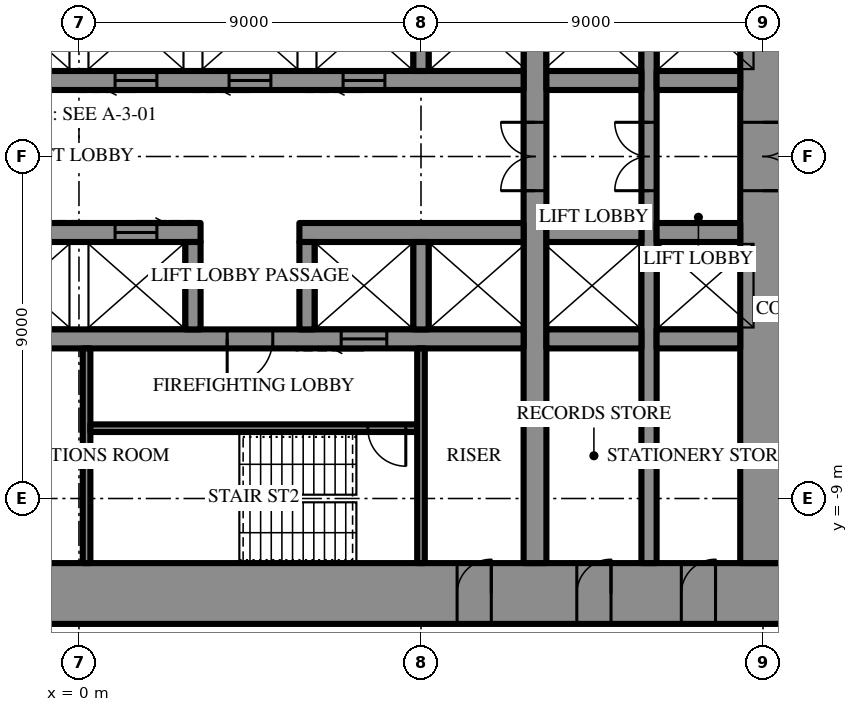
"""IFC4 building model, lengths in metres.
Left out: names, types, materials, properties, quantities, classifications, styles, units other than length and angle.
Written with IfcOpenShell. Run it as: python <this file> out.ifc"""

import sys

from ifc_helpers import new_model, si_unit, direction, frame, frame_2d, origin, place, context, subcontext, project, spatial, rectangle, extrude, element, fill, save


model = new_model("IFC4")
c1 = context("Model", 3, precision=1e-05, world=origin(), true_north=direction((0.0, 1.0)))
c2 = subcontext(c1, "Body", "Model", "MODEL_VIEW")
j1 = project(units=[si_unit("LENGTHUNIT", "METRE"), si_unit("PLANEANGLEUNIT", "RADIAN")], contexts=[c1])
p1 = place(None, origin())
s1 = spatial("IfcSite", under=j1, at=p1, CompositionType="ELEMENT")
p2 = place(p1, origin())
s2 = spatial("IfcBuilding", under=s1, at=p2, CompositionType="ELEMENT")
p3 = place(p2, frame((0.0, 0.0, 23.5)))
s3 = spatial("IfcBuildingStorey", under=s2, at=p3, CompositionType="ELEMENT", Elevation=23.5)
p4 = place(p3, frame((18.6, -11.5, 0.0), z_axis=(0.0, 0.0, 1.0), x_axis=(-1.0, 0.0, 0.0)))
e1 = element("IfcWall", 1, at=p4, inside=s3, PredefinedType="SHEAR", context=c2, shape_type="SweptSolid", body=[
    extrude(rectangle(XDim=37.2, YDim=1.6, at=frame_2d((18.6, 0.0))), origin(), (0.0, 0.0, 1.0), 4.2),
])
p5 = place(p4, frame((19.45, 0.0, 0.0)))
e2 = element("IfcOpeningElement", 2, at=p5, cuts=e1, PredefinedType="OPENING", context=c2, shape_type="SweptSolid", body=[
    extrude(rectangle(XDim=0.9, YDim=2.2, at=frame_2d((0.45, 1.1))), frame((0.0, 0.81, 0.0), z_axis=(0.0, -1.0, 0.0), x_axis=(1.0, 0.0, 0.0)), (0.0, 0.0, 1.0), 1.62),
])
p6 = place(p4, frame((22.45, 0.0, 0.0)))
e3 = element("IfcOpeningElement", 3, at=p6, cuts=e1, PredefinedType="OPENING", context=c2, shape_type="SweptSolid", body=[
    extrude(rectangle(XDim=0.9, YDim=2.2, at=frame_2d((0.45, 1.1))), frame((0.0, 0.81, 0.0), z_axis=(0.0, -1.0, 0.0), x_axis=(1.0, 0.0, 0.0)), (0.0, 0.0, 1.0), 1.62),
])
p7 = place(p4, frame((25.5, 0.0, 0.0)))
e4 = element("IfcOpeningElement", 4, at=p7, cuts=e1, PredefinedType="OPENING", context=c2, shape_type="SweptSolid", body=[
    extrude(rectangle(XDim=1.0, YDim=2.2, at=frame_2d((0.5, 1.1))), frame((0.0, 0.81, 0.0), z_axis=(0.0, -1.0, 0.0), x_axis=(1.0, 0.0, 0.0)), (0.0, 0.0, 1.0), 1.62),
])
p8 = place(p4, frame((1.85, 0.0, 0.0)))
e5 = element("IfcOpeningElement", 5, at=p8, cuts=e1, PredefinedType="OPENING", context=c2, shape_type="SweptSolid", body=[
    extrude(rectangle(XDim=0.9, YDim=2.2, at=frame_2d((0.45, 1.1))), frame((0.0, 0.81, 0.0), z_axis=(0.0, -1.0, 0.0), x_axis=(1.0, 0.0, 0.0)), (0.0, 0.0, 1.0), 1.62),
])
p9 = place(p4, frame((4.6, 0.0, 0.0)))
e6 = element("IfcOpeningElement", 6, at=p9, cuts=e1, PredefinedType="OPENING", context=c2, shape_type="SweptSolid", body=[
    extrude(rectangle(XDim=0.9, YDim=2.2, at=frame_2d((0.45, 1.1))), frame((0.0, 0.81, 0.0), z_axis=(0.0, -1.0, 0.0), x_axis=(1.0, 0.0, 0.0)), (0.0, 0.0, 1.0), 1.62),
])
p10 = place(p4, frame((7.75, 0.0, 0.0)))
e7 = element("IfcOpeningElement", 7, at=p10, cuts=e1, PredefinedType="OPENING", context=c2, shape_type="SweptSolid", body=[
    extrude(rectangle(XDim=0.9, YDim=2.2, at=frame_2d((0.45, 1.1))), frame((0.0, 0.81, 0.0), z_axis=(0.0, -1.0, 0.0), x_axis=(1.0, 0.0, 0.0)), (0.0, 0.0, 1.0), 1.62),
])
p11 = place(p4, frame((28.55, 0.0, 0.0)))
e8 = element("IfcOpeningElement", 8, at=p11, cuts=e1, PredefinedType="OPENING", context=c2, shape_type="SweptSolid", body=[
    extrude(rectangle(XDim=0.9, YDim=2.2, at=frame_2d((0.45, 1.1))), frame((0.0, 0.81, 0.0), z_axis=(0.0, -1.0, 0.0), x_axis=(1.0, 0.0, 0.0)), (0.0, 0.0, 1.0), 1.62),
])
p12 = place(p4, frame((31.7, 0.0, 0.0)))
e9 = element("IfcOpeningElement", 9, at=p12, cuts=e1, PredefinedType="OPENING", context=c2, shape_type="SweptSolid", body=[
    extrude(rectangle(XDim=0.9, YDim=2.2, at=frame_2d((0.45, 1.1))), frame((0.0, 0.81, 0.0), z_axis=(0.0, -1.0, 0.0), x_axis=(1.0, 0.0, 0.0)), (0.0, 0.0, 1.0), 1.62),
])
p13 = place(p4, frame((34.45, 0.0, 0.0)))
e10 = element("IfcOpeningElement", 10, at=p13, cuts=e1, PredefinedType="OPENING", context=c2, shape_type="SweptSolid", body=[
    extrude(rectangle(XDim=0.9, YDim=2.2, at=frame_2d((0.45, 1.1))), frame((0.0, 0.81, 0.0), z_axis=(0.0, -1.0, 0.0), x_axis=(1.0, 0.0, 0.0)), (0.0, 0.0, 1.0), 1.62),
])
p14 = place(p3, frame((18.0, -10.7, 0.0), z_axis=(0.0, 0.0, 1.0), x_axis=(0.0, 1.0, 0.0)))
e11 = element("IfcWall", 11, at=p14, inside=s3, PredefinedType="SHEAR", context=c2, shape_type="SweptSolid", body=[
    extrude(rectangle(XDim=21.4, YDim=1.2, at=frame_2d((10.7, 0.0))), origin(), (0.0, 0.0, 1.0), 4.2),
])
p15 = place(p14, frame((9.8, 0.0, 0.0)))
e12 = element("IfcOpeningElement", 12, at=p15, cuts=e11, PredefinedType="OPENING", context=c2, shape_type="SweptSolid", body=[
    extrude(rectangle(XDim=1.8, YDim=2.4, at=frame_2d((0.9, 1.2))), frame((0.0, 0.61, 0.0), z_axis=(0.0, -1.0, 0.0), x_axis=(1.0, 0.0, 0.0)), (0.0, 0.0, 1.0), 1.22),
])
p16 = place(p3, frame((12.0, -10.7, 0.0), z_axis=(0.0, 0.0, 1.0), x_axis=(0.0, 1.0, 0.0)))
e13 = element("IfcWall", 13, at=p16, inside=s3, PredefinedType="SHEAR", context=c2, shape_type="SweptSolid", body=[
    extrude(rectangle(XDim=21.4, YDim=0.6, at=frame_2d((10.7, 0.0))), origin(), (0.0, 0.0, 1.0), 4.2),
])
p17 = place(p16, frame((9.8, 0.0, 0.0)))
e14 = element("IfcOpeningElement", 14, at=p17, cuts=e13, PredefinedType="OPENING", context=c2, shape_type="SweptSolid", body=[
    extrude(rectangle(XDim=1.8, YDim=2.4, at=frame_2d((0.9, 1.2))), frame((0.0, 0.31, 0.0), z_axis=(0.0, -1.0, 0.0), x_axis=(1.0, 0.0, 0.0)), (0.0, 0.0, 1.0), 0.62),
])
p18 = place(p3, frame((15.0, -10.7, 0.0), z_axis=(0.0, 0.0, 1.0), x_axis=(0.0, 1.0, 0.0)))
e15 = element("IfcWall", 15, at=p18, inside=s3, PredefinedType="SHEAR", context=c2, shape_type="SweptSolid", body=[
    extrude(rectangle(XDim=21.4, YDim=0.4, at=frame_2d((10.7, 0.0))), origin(), (0.0, 0.0, 1.0), 4.2),
])
p19 = place(p18, frame((9.8, 0.0, 0.0)))
e16 = element("IfcOpeningElement", 16, at=p19, cuts=e15, PredefinedType="OPENING", context=c2, shape_type="SweptSolid", body=[
    extrude(rectangle(XDim=1.8, YDim=2.4, at=frame_2d((0.9, 1.2))), frame((0.0, 0.21, 0.0), z_axis=(0.0, -1.0, 0.0), x_axis=(1.0, 0.0, 0.0)), (0.0, 0.0, 1.0), 0.42),
])
p20 = place(p3, frame((-3.2, 2.0, 0.0), z_axis=(0.0, 0.0, 1.0), x_axis=(1.0, 0.0, 0.0)))
e17 = element("IfcWall", 17, at=p20, inside=s3, PredefinedType="SHEAR", context=c2, shape_type="SweptSolid", body=[
    extrude(rectangle(XDim=14.9, YDim=0.5, at=frame_2d((7.45, 0.0))), origin(), (0.0, 0.0, 1.0), 4.2),
])
p21 = place(p20, frame((1.15, 0.0, 0.0)))
e18 = element("IfcOpeningElement", 18, at=p21, cuts=e17, PredefinedType="OPENING", context=c2, shape_type="SweptSolid", body=[
    extrude(rectangle(XDim=1.1, YDim=2.2, at=frame_2d((0.55, 1.1))), frame((0.0, 0.26, 0.0), z_axis=(0.0, -1.0, 0.0), x_axis=(1.0, 0.0, 0.0)), (0.0, 0.0, 1.0), 0.52),
])
p22 = place(p20, frame((4.15, 0.0, 0.0)))
e19 = element("IfcOpeningElement", 19, at=p22, cuts=e17, PredefinedType="OPENING", context=c2, shape_type="SweptSolid", body=[
    extrude(rectangle(XDim=1.1, YDim=2.2, at=frame_2d((0.55, 1.1))), frame((0.0, 0.26, 0.0), z_axis=(0.0, -1.0, 0.0), x_axis=(1.0, 0.0, 0.0)), (0.0, 0.0, 1.0), 0.52),
])
p23 = place(p20, frame((7.15, 0.0, 0.0)))
e20 = element("IfcOpeningElement", 20, at=p23, cuts=e17, PredefinedType="OPENING", context=c2, shape_type="SweptSolid", body=[
    extrude(rectangle(XDim=1.1, YDim=2.2, at=frame_2d((0.55, 1.1))), frame((0.0, 0.26, 0.0), z_axis=(0.0, -1.0, 0.0), x_axis=(1.0, 0.0, 0.0)), (0.0, 0.0, 1.0), 0.52),
])
p24 = place(p20, frame((10.15, 0.0, 0.0)))
e21 = element("IfcOpeningElement", 21, at=p24, cuts=e17, PredefinedType="OPENING", context=c2, shape_type="SweptSolid", body=[
    extrude(rectangle(XDim=1.1, YDim=2.2, at=frame_2d((0.55, 1.1))), frame((0.0, 0.26, 0.0), z_axis=(0.0, -1.0, 0.0), x_axis=(1.0, 0.0, 0.0)), (0.0, 0.0, 1.0), 0.52),
])
p25 = place(p3, frame((12.3, 2.0, 0.0), z_axis=(0.0, 0.0, 1.0), x_axis=(1.0, 0.0, 0.0)))
e22 = element("IfcWall", 22, at=p25, inside=s3, PredefinedType="SHEAR", context=c2, shape_type="SweptSolid", body=[
    extrude(rectangle(XDim=2.5, YDim=0.5, at=frame_2d((1.25, 0.0))), origin(), (0.0, 0.0, 1.0), 4.2),
])
p26 = place(p3, frame((15.2, 2.0, 0.0), z_axis=(0.0, 0.0, 1.0), x_axis=(1.0, 0.0, 0.0)))
e23 = element("IfcWall", 23, at=p26, inside=s3, PredefinedType="SHEAR", context=c2, shape_type="SweptSolid", body=[
    extrude(rectangle(XDim=2.2, YDim=0.5, at=frame_2d((1.1, 0.0))), origin(), (0.0, 0.0, 1.0), 4.2),
])
p27 = place(p3, frame((9.0, 2.25, 0.0), z_axis=(0.0, 0.0, 1.0), x_axis=(0.0, 1.0, 0.0)))
e24 = element("IfcWall", 24, at=p27, inside=s3, PredefinedType="SHEAR", context=c2, shape_type="SweptSolid", body=[
    extrude(rectangle(XDim=2.3, YDim=0.4, at=frame_2d((1.15, 0.0))), origin(), (0.0, 0.0, 1.0), 4.2),
])
p28 = place(p3, frame((17.4, -2.0, 0.0), z_axis=(0.0, 0.0, 1.0), x_axis=(-1.0, 0.0, 0.0)))
e25 = element("IfcWall", 25, at=p28, inside=s3, PredefinedType="SHEAR", context=c2, shape_type="SweptSolid", body=[
    extrude(rectangle(XDim=2.2, YDim=0.5, at=frame_2d((1.1, 0.0))), origin(), (0.0, 0.0, 1.0), 4.2),
])
p29 = place(p3, frame((14.8, -2.0, 0.0), z_axis=(0.0, 0.0, 1.0), x_axis=(-1.0, 0.0, 0.0)))
e26 = element("IfcWall", 26, at=p29, inside=s3, PredefinedType="SHEAR", context=c2, shape_type="SweptSolid", body=[
    extrude(rectangle(XDim=2.5, YDim=0.5, at=frame_2d((1.25, 0.0))), origin(), (0.0, 0.0, 1.0), 4.2),
])
p30 = place(p3, frame((11.7, -2.0, 0.0), z_axis=(0.0, 0.0, 1.0), x_axis=(-1.0, 0.0, 0.0)))
e27 = element("IfcWall", 27, at=p30, inside=s3, PredefinedType="SHEAR", context=c2, shape_type="SweptSolid", body=[
    extrude(rectangle(XDim=5.9, YDim=0.5, at=frame_2d((2.95, 0.0))), origin(), (0.0, 0.0, 1.0), 4.2),
])
p31 = place(p3, frame((3.2, -2.0, 0.0), z_axis=(0.0, 0.0, 1.0), x_axis=(-1.0, 0.0, 0.0)))
e28 = element("IfcWall", 28, at=p31, inside=s3, PredefinedType="SHEAR", context=c2, shape_type="SweptSolid", body=[
    extrude(rectangle(XDim=14.9, YDim=0.5, at=frame_2d((7.45, 0.0))), origin(), (0.0, 0.0, 1.0), 4.2),
])
p32 = place(p31, frame((1.15, 0.0, 0.0)))
e29 = element("IfcOpeningElement", 29, at=p32, cuts=e28, PredefinedType="OPENING", context=c2, shape_type="SweptSolid", body=[
    extrude(rectangle(XDim=1.1, YDim=2.2, at=frame_2d((0.55, 1.1))), frame((0.0, 0.26, 0.0), z_axis=(0.0, -1.0, 0.0), x_axis=(1.0, 0.0, 0.0)), (0.0, 0.0, 1.0), 0.52),
])
p33 = place(p31, frame((4.15, 0.0, 0.0)))
e30 = element("IfcOpeningElement", 30, at=p33, cuts=e28, PredefinedType="OPENING", context=c2, shape_type="SweptSolid", body=[
    extrude(rectangle(XDim=1.1, YDim=2.2, at=frame_2d((0.55, 1.1))), frame((0.0, 0.26, 0.0), z_axis=(0.0, -1.0, 0.0), x_axis=(1.0, 0.0, 0.0)), (0.0, 0.0, 1.0), 0.52),
])
p34 = place(p31, frame((7.15, 0.0, 0.0)))
e31 = element("IfcOpeningElement", 31, at=p34, cuts=e28, PredefinedType="OPENING", context=c2, shape_type="SweptSolid", body=[
    extrude(rectangle(XDim=1.1, YDim=2.2, at=frame_2d((0.55, 1.1))), frame((0.0, 0.26, 0.0), z_axis=(0.0, -1.0, 0.0), x_axis=(1.0, 0.0, 0.0)), (0.0, 0.0, 1.0), 0.52),
])
p35 = place(p31, frame((10.15, 0.0, 0.0)))
e32 = element("IfcOpeningElement", 32, at=p35, cuts=e28, PredefinedType="OPENING", context=c2, shape_type="SweptSolid", body=[
    extrude(rectangle(XDim=1.1, YDim=2.2, at=frame_2d((0.55, 1.1))), frame((0.0, 0.26, 0.0), z_axis=(0.0, -1.0, 0.0), x_axis=(1.0, 0.0, 0.0)), (0.0, 0.0, 1.0), 0.52),
])
p36 = place(p3, frame((17.4, -4.8, 0.0), z_axis=(0.0, 0.0, 1.0), x_axis=(-1.0, 0.0, 0.0)))
e33 = element("IfcWall", 33, at=p36, inside=s3, PredefinedType="SHEAR", context=c2, shape_type="SweptSolid", body=[
    extrude(rectangle(XDim=2.2, YDim=0.5, at=frame_2d((1.1, 0.0))), origin(), (0.0, 0.0, 1.0), 4.2),
])
p37 = place(p3, frame((14.8, -4.8, 0.0), z_axis=(0.0, 0.0, 1.0), x_axis=(-1.0, 0.0, 0.0)))
e34 = element("IfcWall", 34, at=p37, inside=s3, PredefinedType="SHEAR", context=c2, shape_type="SweptSolid", body=[
    extrude(rectangle(XDim=2.5, YDim=0.5, at=frame_2d((1.25, 0.0))), origin(), (0.0, 0.0, 1.0), 4.2),
])
p38 = place(p3, frame((11.7, -4.8, 0.0), z_axis=(0.0, 0.0, 1.0), x_axis=(-1.0, 0.0, 0.0)))
e35 = element("IfcWall", 35, at=p38, inside=s3, PredefinedType="SHEAR", context=c2, shape_type="SweptSolid", body=[
    extrude(rectangle(XDim=23.4, YDim=0.5, at=frame_2d((11.7, 0.0))), origin(), (0.0, 0.0, 1.0), 4.2),
])
p39 = place(p38, frame((6.6, 0.0, 0.0)))
e36 = element("IfcOpeningElement", 36, at=p39, cuts=e35, PredefinedType="OPENING", context=c2, shape_type="SweptSolid", body=[
    extrude(rectangle(XDim=1.2, YDim=2.2, at=frame_2d((0.6, 1.1))), frame((0.0, 0.26, 0.0), z_axis=(0.0, -1.0, 0.0), x_axis=(1.0, 0.0, 0.0)), (0.0, 0.0, 1.0), 0.52),
])
p40 = place(p38, frame((3.6, 0.0, 0.0)))
e37 = element("IfcOpeningElement", 37, at=p40, cuts=e35, PredefinedType="OPENING", context=c2, shape_type="SweptSolid", body=[
    extrude(rectangle(XDim=1.2, YDim=2.2, at=frame_2d((0.6, 1.1))), frame((0.0, 0.26, 0.0), z_axis=(0.0, -1.0, 0.0), x_axis=(1.0, 0.0, 0.0)), (0.0, 0.0, 1.0), 0.52),
])
for number, where, z_axis, x_axis in (
    (38, (9.0, -2.25, 0.0), (0.0, 0.0, 1.0), (0.0, -1.0, 0.0)),
    (39, (6.0, -2.25, 0.0), (0.0, 0.0, 1.0), (0.0, -1.0, 0.0)),
    (40, (3.0, -2.25, 0.0), (0.0, 0.0, 1.0), (0.0, -1.0, 0.0)),
):
    element("IfcWall", number, at=place(p3, frame(where, z_axis=z_axis, x_axis=x_axis)), inside=s3, PredefinedType="SHEAR", context=c2, shape_type="SweptSolid", body=[
        extrude(rectangle(XDim=2.3, YDim=0.4, at=frame_2d((1.15, 0.0))), origin(), (0.0, 0.0, 1.0), 4.2),
    ])
p41 = place(p3, frame((0.2, -5.05, 0.0), z_axis=(0.0, 0.0, 1.0), x_axis=(0.0, -1.0, 0.0)))
e41 = element("IfcWall", 41, at=p41, inside=s3, PredefinedType="SHEAR", context=c2, shape_type="SweptSolid", body=[
    extrude(rectangle(XDim=5.65, YDim=0.2, at=frame_2d((2.825, 0.0))), origin(), (0.0, 0.0, 1.0), 4.2),
])
p42 = place(p3, frame((8.9, -7.15, 0.0), z_axis=(0.0, 0.0, 1.0), x_axis=(-1.0, 0.0, 0.0)))
e42 = element("IfcWall", 42, at=p42, inside=s3, PredefinedType="SHEAR", context=c2, shape_type="SweptSolid", body=[
    extrude(rectangle(XDim=8.6, YDim=0.2, at=frame_2d((4.3, 0.0))), origin(), (0.0, 0.0, 1.0), 4.2),
])
p43 = place(p42, frame((0.3, 0.0, 0.0)))
e43 = element("IfcOpeningElement", 43, at=p43, cuts=e42, PredefinedType="OPENING", context=c2, shape_type="SweptSolid", body=[
    extrude(rectangle(XDim=1.0, YDim=2.2, at=frame_2d((0.5, 1.1))), frame((0.0, 0.11, 0.0), z_axis=(0.0, -1.0, 0.0), x_axis=(1.0, 0.0, 0.0)), (0.0, 0.0, 1.0), 0.22),
])
p44 = place(p3, frame((9.0, -5.05, 0.0), z_axis=(0.0, 0.0, 1.0), x_axis=(0.0, -1.0, 0.0)))
e44 = element("IfcWall", 44, at=p44, inside=s3, PredefinedType="PARTITIONING", context=c2, shape_type="SweptSolid", body=[
    extrude(rectangle(XDim=5.65, YDim=0.2, at=frame_2d((2.825, 0.0))), origin(), (0.0, 0.0, 1.0), 4.0),
])
p45 = place(p15, frame((1.8, 0.0, 0.0), z_axis=(0.0, 0.0, 1.0), x_axis=(-1.0, 0.0, 0.0)))
e45 = element("IfcDoor", 45, at=p45, inside=s3, OperationType="DOUBLE_DOOR_SINGLE_SWING", PredefinedType="DOOR", context=c2, shape_type="SweptSolid", body=[
    extrude(rectangle(XDim=1.8, YDim=2.4, at=frame_2d((0.9, 1.2))), frame((0.0, 0.025, 0.0), z_axis=(0.0, -1.0, 0.0), x_axis=(1.0, 0.0, 0.0)), (0.0, 0.0, 1.0), 0.05),
])
fill(e12, e45)
p46 = place(p39, origin())
e46 = element("IfcDoor", 46, at=p46, inside=s3, OperationType="SINGLE_SWING_LEFT", PredefinedType="DOOR", context=c2, shape_type="SweptSolid", body=[
    extrude(rectangle(XDim=1.2, YDim=2.2, at=frame_2d((0.6, 1.1))), frame((0.0, 0.025, 0.0), z_axis=(0.0, -1.0, 0.0), x_axis=(1.0, 0.0, 0.0)), (0.0, 0.0, 1.0), 0.05),
])
fill(e36, e46)
p47 = place(p43, origin())
e47 = element("IfcDoor", 47, at=p47, inside=s3, OperationType="SINGLE_SWING_RIGHT", PredefinedType="DOOR", context=c2, shape_type="SweptSolid", body=[
    extrude(rectangle(XDim=1.0, YDim=2.2, at=frame_2d((0.5, 1.1))), frame((0.0, 0.025, 0.0), z_axis=(0.0, -1.0, 0.0), x_axis=(1.0, 0.0, 0.0)), (0.0, 0.0, 1.0), 0.05),
])
fill(e43, e47)
p48 = place(p8, frame((0.9, 0.0, 0.0), z_axis=(0.0, 0.0, 1.0), x_axis=(-1.0, 0.0, 0.0)))
e48 = element("IfcDoor", 48, at=p48, inside=s3, OperationType="SINGLE_SWING_LEFT", PredefinedType="DOOR", context=c2, shape_type="SweptSolid", body=[
    extrude(rectangle(XDim=0.9, YDim=2.2, at=frame_2d((0.45, 1.1))), frame((0.0, 0.025, 0.0), z_axis=(0.0, -1.0, 0.0), x_axis=(1.0, 0.0, 0.0)), (0.0, 0.0, 1.0), 0.05),
])
fill(e5, e48)
p49 = place(p9, frame((0.9, 0.0, 0.0), z_axis=(0.0, 0.0, 1.0), x_axis=(-1.0, 0.0, 0.0)))
e49 = element("IfcDoor", 49, at=p49, inside=s3, OperationType="SINGLE_SWING_LEFT", PredefinedType="DOOR", context=c2, shape_type="SweptSolid", body=[
    extrude(rectangle(XDim=0.9, YDim=2.2, at=frame_2d((0.45, 1.1))), frame((0.0, 0.025, 0.0), z_axis=(0.0, -1.0, 0.0), x_axis=(1.0, 0.0, 0.0)), (0.0, 0.0, 1.0), 0.05),
])
fill(e6, e49)
p50 = place(p10, frame((0.9, 0.0, 0.0), z_axis=(0.0, 0.0, 1.0), x_axis=(-1.0, 0.0, 0.0)))
e50 = element("IfcDoor", 50, at=p50, inside=s3, OperationType="SINGLE_SWING_LEFT", PredefinedType="DOOR", context=c2, shape_type="SweptSolid", body=[
    extrude(rectangle(XDim=0.9, YDim=2.2, at=frame_2d((0.45, 1.1))), frame((0.0, 0.025, 0.0), z_axis=(0.0, -1.0, 0.0), x_axis=(1.0, 0.0, 0.0)), (0.0, 0.0, 1.0), 0.05),
])
fill(e7, e50)
p51 = place(p17, origin())
e51 = element("IfcDoor", 51, at=p51, inside=s3, OperationType="DOUBLE_DOOR_SINGLE_SWING", PredefinedType="DOOR", context=c2, shape_type="SweptSolid", body=[
    extrude(rectangle(XDim=1.8, YDim=2.4, at=frame_2d((0.9, 1.2))), frame((0.0, 0.025, 0.0), z_axis=(0.0, -1.0, 0.0), x_axis=(1.0, 0.0, 0.0)), (0.0, 0.0, 1.0), 0.05),
])
fill(e14, e51)
p52 = place(p19, origin())
e52 = element("IfcDoor", 52, at=p52, inside=s3, OperationType="DOUBLE_DOOR_SINGLE_SWING", PredefinedType="DOOR", context=c2, shape_type="SweptSolid", body=[
    extrude(rectangle(XDim=1.8, YDim=2.4, at=frame_2d((0.9, 1.2))), frame((0.0, 0.025, 0.0), z_axis=(0.0, -1.0, 0.0), x_axis=(1.0, 0.0, 0.0)), (0.0, 0.0, 1.0), 0.05),
])
fill(e16, e52)
p53 = place(p22, frame((1.1, 0.0, 0.0), z_axis=(0.0, 0.0, 1.0), x_axis=(-1.0, 0.0, 0.0)))
e53 = element("IfcDoor", 53, at=p53, inside=s3, OperationType="SLIDING_TO_LEFT", PredefinedType="DOOR", context=c2, shape_type="SweptSolid", body=[
    extrude(rectangle(XDim=1.1, YDim=2.2, at=frame_2d((0.55, 1.1))), frame((0.0, 0.025, 0.0), z_axis=(0.0, -1.0, 0.0), x_axis=(1.0, 0.0, 0.0)), (0.0, 0.0, 1.0), 0.05),
])
fill(e19, e53)
p54 = place(p23, frame((1.1, 0.0, 0.0), z_axis=(0.0, 0.0, 1.0), x_axis=(-1.0, 0.0, 0.0)))
e54 = element("IfcDoor", 54, at=p54, inside=s3, OperationType="SLIDING_TO_LEFT", PredefinedType="DOOR", context=c2, shape_type="SweptSolid", body=[
    extrude(rectangle(XDim=1.1, YDim=2.2, at=frame_2d((0.55, 1.1))), frame((0.0, 0.025, 0.0), z_axis=(0.0, -1.0, 0.0), x_axis=(1.0, 0.0, 0.0)), (0.0, 0.0, 1.0), 0.05),
])
fill(e20, e54)
p55 = place(p24, frame((1.1, 0.0, 0.0), z_axis=(0.0, 0.0, 1.0), x_axis=(-1.0, 0.0, 0.0)))
e55 = element("IfcDoor", 55, at=p55, inside=s3, OperationType="SLIDING_TO_LEFT", PredefinedType="DOOR", context=c2, shape_type="SweptSolid", body=[
    extrude(rectangle(XDim=1.1, YDim=2.2, at=frame_2d((0.55, 1.1))), frame((0.0, 0.025, 0.0), z_axis=(0.0, -1.0, 0.0), x_axis=(1.0, 0.0, 0.0)), (0.0, 0.0, 1.0), 0.05),
])
fill(e21, e55)
p56 = place(p40, origin())
e56 = element("IfcDoor", 56, at=p56, inside=s3, OperationType="SLIDING_TO_LEFT", PredefinedType="DOOR", context=c2, shape_type="SweptSolid", body=[
    extrude(rectangle(XDim=1.2, YDim=2.2, at=frame_2d((0.6, 1.1))), frame((0.0, 0.025, 0.0), z_axis=(0.0, -1.0, 0.0), x_axis=(1.0, 0.0, 0.0)), (0.0, 0.0, 1.0), 0.05),
])
fill(e37, e56)
p57 = place(p32, frame((1.1, 0.0, 0.0), z_axis=(0.0, 0.0, 1.0), x_axis=(-1.0, 0.0, 0.0)))
e57 = element("IfcDoor", 57, at=p57, inside=s3, OperationType="SLIDING_TO_LEFT", PredefinedType="DOOR", context=c2, shape_type="SweptSolid", body=[
    extrude(rectangle(XDim=1.1, YDim=2.2, at=frame_2d((0.55, 1.1))), frame((0.0, 0.025, 0.0), z_axis=(0.0, -1.0, 0.0), x_axis=(1.0, 0.0, 0.0)), (0.0, 0.0, 1.0), 0.05),
])
fill(e29, e57)
save(model, sys.argv[1])
